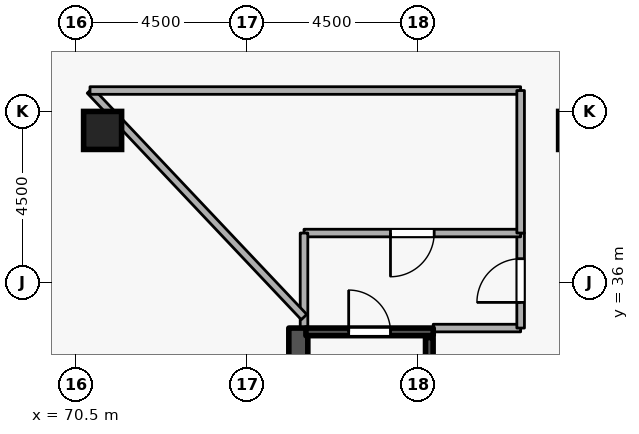
"""IFC4 building model, lengths in metres.
Left out: names, types, materials, properties, quantities, classifications, styles, units other than length and angle.
Written with IfcOpenShell. Run it as: python <this file> out.ifc"""

import sys

from ifc_helpers import new_model, si_unit, direction, frame, frame_2d, origin, origin_2d, place, context, subcontext, project, spatial, rectangle, extrude, element, fill, save


model = new_model("IFC4")
c1 = context("Model", 3, precision=1e-05, world=origin(), true_north=direction((0.0, 1.0)))
c2 = subcontext(c1, "Body", "Model", "MODEL_VIEW")
j1 = project(units=[si_unit("LENGTHUNIT", "METRE"), si_unit("PLANEANGLEUNIT", "RADIAN")], contexts=[c1])
p1 = place(None, origin())
s1 = spatial("IfcSite", under=j1, at=p1, CompositionType="ELEMENT")
p2 = place(p1, origin())
s2 = spatial("IfcBuilding", under=s1, at=p2, CompositionType="ELEMENT")
p3 = place(p2, frame((0.0, 0.0, 221.7)))
s3 = spatial("IfcBuildingStorey", under=s2, at=p3, CompositionType="ELEMENT", Elevation=221.7)
p4 = place(p3, frame((76.35, 19.2, 0.0), z_axis=(0.0, 0.0, 1.0), x_axis=(0.0, 1.0, 0.0)))
e1 = element("IfcWall", 1, at=p4, inside=s3, PredefinedType="SHEAR", context=c2, shape_type="SweptSolid", body=[
    extrude(rectangle(XDim=15.6, YDim=0.5, at=frame_2d((7.8, 0.0))), origin(), (0.0, 0.0, 1.0), 4.2),
])
p5 = place(p3, frame((71.2, 40.0, 0.0), z_axis=(0.0, 0.0, 1.0), x_axis=(1.0, 0.0, 0.0)))
e2 = element("IfcColumn", 2, at=p5, inside=s3, PredefinedType="COLUMN", context=c2, shape_type="SweptSolid", body=[
    extrude(rectangle(XDim=1.0, YDim=1.0, at=origin_2d()), origin(), (0.0, 0.0, 1.0), 4.2),
])
p6 = place(p3, frame((76.55, 34.7, 0.0), z_axis=(0.0, 0.0, 1.0), x_axis=(1.0, 0.0, 0.0)))
e3 = element("IfcWall", 3, at=p6, inside=s3, PredefinedType="SHEAR", context=c2, shape_type="SweptSolid", body=[
    extrude(rectangle(XDim=3.35, YDim=0.2, at=frame_2d((1.675, 0.0))), origin(), (0.0, 0.0, 1.0), 4.2),
])
p7 = place(p6, frame((1.125, 0.0, 0.0)))
e4 = element("IfcOpeningElement", 4, at=p7, cuts=e3, PredefinedType="OPENING", context=c2, shape_type="SweptSolid", body=[
    extrude(rectangle(XDim=1.1, YDim=2.1, at=frame_2d((0.55, 1.05))), frame((0.0, 0.11, 0.0), z_axis=(0.0, -1.0, 0.0), x_axis=(1.0, 0.0, 0.0)), (0.0, 0.0, 1.0), 0.22),
])
p8 = place(p3, frame((79.797, 27.45, 0.0), z_axis=(0.0, 0.0, 1.0), x_axis=(0.0, 1.0, 0.0)))
e5 = element("IfcWall", 5, at=p8, inside=s3, PredefinedType="SHEAR", context=c2, shape_type="SweptSolid", body=[
    extrude(rectangle(XDim=7.1, YDim=0.2, at=frame_2d((3.55, 0.0))), origin(), (0.0, 0.0, 1.0), 4.2),
])
p9 = place(p3, frame((79.9, 34.8, 0.0), z_axis=(0.0, 0.0, 1.0), x_axis=(1.0, 0.0, 0.0)))
e6 = element("IfcWall", 6, at=p9, inside=s3, PredefinedType="STANDARD", context=c2, shape_type="SweptSolid", body=[
    extrude(rectangle(XDim=2.3, YDim=0.2, at=frame_2d((1.15, 0.0))), origin(), (0.0, 0.0, 1.0), 3.145),
])
p10 = place(p3, frame((82.2, 34.8, 0.0), z_axis=(0.0, 0.0, 1.0), x_axis=(0.0, 1.0, 0.0)))
e7 = element("IfcWall", 7, at=p10, inside=s3, PredefinedType="STANDARD", context=c2, shape_type="SweptSolid", body=[
    extrude(rectangle(XDim=2.5, YDim=0.2, at=frame_2d((1.25, 0.0))), origin(), (0.0, 0.0, 1.0), 3.94),
])
p11 = place(p10, frame((0.675, 0.0, 0.0)))
e8 = element("IfcOpeningElement", 8, at=p11, cuts=e7, PredefinedType="OPENING", context=c2, shape_type="SweptSolid", body=[
    extrude(rectangle(XDim=1.15, YDim=2.1, at=frame_2d((0.575, 1.05))), frame((0.0, 0.11, 0.0), z_axis=(0.0, -1.0, 0.0), x_axis=(1.0, 0.0, 0.0)), (0.0, 0.0, 1.0), 0.22),
])
p12 = place(p3, frame((82.2, 37.3, 0.0), z_axis=(0.0, 0.0, 1.0), x_axis=(-1.0, 0.0, 0.0)))
e9 = element("IfcWall", 9, at=p12, inside=s3, PredefinedType="STANDARD", context=c2, shape_type="SweptSolid", body=[
    extrude(rectangle(XDim=5.7, YDim=0.2, at=frame_2d((2.85, 0.0))), origin(), (0.0, 0.0, 1.0), 3.94),
])
p13 = place(p12, frame((2.275, 0.0, 0.0)))
e10 = element("IfcOpeningElement", 10, at=p13, cuts=e9, PredefinedType="OPENING", context=c2, shape_type="SweptSolid", body=[
    extrude(rectangle(XDim=1.15, YDim=2.1, at=frame_2d((0.575, 1.05))), frame((0.0, 0.11, 0.0), z_axis=(0.0, -1.0, 0.0), x_axis=(1.0, 0.0, 0.0)), (0.0, 0.0, 1.0), 0.22),
])
p14 = place(p3, frame((76.5, 37.3, 0.0), z_axis=(0.0, 0.0, 1.0), x_axis=(0.0, -1.0, 0.0)))
e11 = element("IfcWall", 11, at=p14, inside=s3, PredefinedType="STANDARD", context=c2, shape_type="SweptSolid", body=[
    extrude(rectangle(XDim=2.5, YDim=0.2, at=frame_2d((1.25, 0.0))), origin(), (0.0, 0.0, 1.0), 3.94),
])
p15 = place(p3, frame((76.5, 35.09, 0.0), z_axis=(0.0, 0.0, 1.0), x_axis=(-0.686815846926, 0.72683147456, 0.0)))
e12 = element("IfcWall", 12, at=p15, inside=s3, PredefinedType="STANDARD", context=c2, shape_type="SweptSolid", body=[
    extrude(rectangle(XDim=8.2, YDim=0.2, at=frame_2d((4.1, 0.0))), origin(), (0.0, 0.0, 1.0), 3.94),
])
p16 = place(p3, frame((70.868, 41.05, 0.0), z_axis=(0.0, 0.0, 1.0), x_axis=(1.0, 0.0, 0.0)))
e13 = element("IfcWall", 13, at=p16, inside=s3, PredefinedType="STANDARD", context=c2, shape_type="SweptSolid", body=[
    extrude(rectangle(XDim=11.332, YDim=0.2, at=frame_2d((5.666, 0.0))), origin(), (0.0, 0.0, 1.0), 3.94),
])
p17 = place(p3, frame((82.2, 41.05, 0.0), z_axis=(0.0, 0.0, 1.0), x_axis=(0.0, -1.0, 0.0)))
e14 = element("IfcWall", 14, at=p17, inside=s3, PredefinedType="STANDARD", context=c2, shape_type="SweptSolid", body=[
    extrude(rectangle(XDim=3.75, YDim=0.2, at=frame_2d((1.875, 0.0))), origin(), (0.0, 0.0, 1.0), 3.94),
])
p18 = place(p7, origin())
e15 = element("IfcDoor", 15, at=p18, inside=s3, OperationType="SINGLE_SWING_LEFT", PredefinedType="DOOR", context=c2, shape_type="SweptSolid", body=[
    extrude(rectangle(XDim=1.1, YDim=2.1, at=frame_2d((0.55, 1.05))), frame((0.0, 0.025, 0.0), z_axis=(0.0, -1.0, 0.0), x_axis=(1.0, 0.0, 0.0)), (0.0, 0.0, 1.0), 0.05),
])
fill(e4, e15)
p19 = place(p11, origin())
e16 = element("IfcDoor", 16, at=p19, inside=s3, OperationType="SINGLE_SWING_LEFT", PredefinedType="DOOR", context=c2, shape_type="SweptSolid", body=[
    extrude(rectangle(XDim=1.15, YDim=2.1, at=frame_2d((0.575, 1.05))), frame((0.0, 0.025, 0.0), z_axis=(0.0, -1.0, 0.0), x_axis=(1.0, 0.0, 0.0)), (0.0, 0.0, 1.0), 0.05),
])
fill(e8, e16)
p20 = place(p13, origin())
e17 = element("IfcDoor", 17, at=p20, inside=s3, OperationType="SINGLE_SWING_RIGHT", PredefinedType="DOOR", context=c2, shape_type="SweptSolid", body=[
    extrude(rectangle(XDim=1.15, YDim=2.1, at=frame_2d((0.575, 1.05))), frame((0.0, 0.025, 0.0), z_axis=(0.0, -1.0, 0.0), x_axis=(1.0, 0.0, 0.0)), (0.0, 0.0, 1.0), 0.05),
])
fill(e10, e17)
save(model, sys.argv[1])
